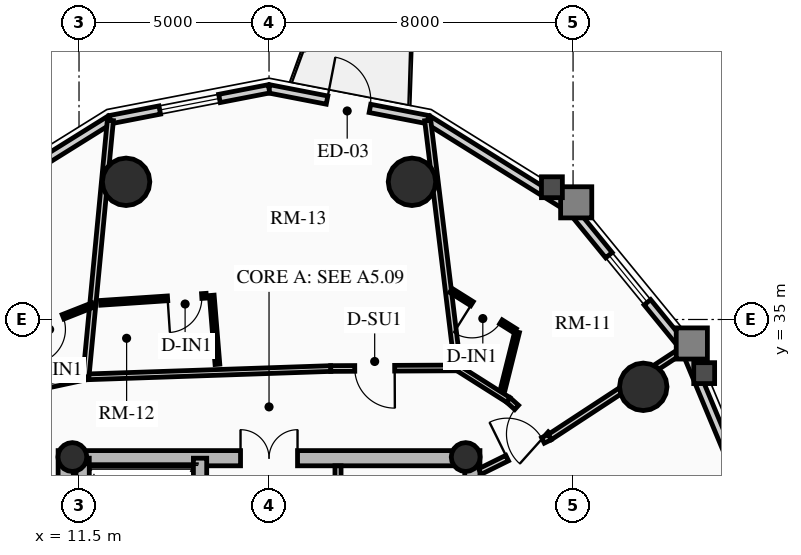
"""IFC4 building model, lengths in metres.
Left out: names, types, materials, properties, quantities, classifications, styles, units other than length and angle.
Written with IfcOpenShell. Run it as: python <this file> out.ifc"""

import sys

from ifc_helpers import new_model, si_unit, direction, frame, frame_2d, origin, origin_2d, place, context, subcontext, project, spatial, rectangle, circle, hollow_circle, extrude, source, transform, mapped, element, fill, save


model = new_model("IFC4")
c1 = context("Model", 3, precision=1e-05, world=origin(), true_north=direction((0.0, 1.0)))
c2 = subcontext(c1, "Body", "Model", "MODEL_VIEW")
j1 = project(units=[si_unit("LENGTHUNIT", "METRE"), si_unit("PLANEANGLEUNIT", "RADIAN")], contexts=[c1])
p1 = place(None, origin())
s1 = spatial("IfcSite", under=j1, at=p1, CompositionType="ELEMENT")
p2 = place(p1, origin())
s2 = spatial("IfcBuilding", under=s1, at=p2, CompositionType="ELEMENT")
p3 = place(p2, frame((0.0, 0.0, 177.79)))
s3 = spatial("IfcBuildingStorey", under=s2, at=p3, CompositionType="ELEMENT", Elevation=177.79)
for number, where, z_axis, x_axis in (
    (1, (11.15, 17.45, 0.0), (0.0, 0.0, 1.0), (0.0, 1.0, 0.0)),
    (2, (21.85, 17.45, 0.0), (0.0, 0.0, 1.0), (0.0, 1.0, 0.0)),
):
    element("IfcWall", number, at=place(p3, frame(where, z_axis=z_axis, x_axis=x_axis)), inside=s3, PredefinedType="SHEAR", context=c2, shape_type="SweptSolid", body=[
        extrude(rectangle(XDim=14.1, YDim=0.4, at=frame_2d((7.05, 0.0))), origin(), (0.0, 0.0, 1.0), 2.91),
    ])
p4 = place(p3, frame((11.15, 31.35, 0.0), z_axis=(0.0, 0.0, 1.0), x_axis=(1.0, 0.0, 0.0)))
e3 = element("IfcWall", 3, at=p4, inside=s3, PredefinedType="SHEAR", context=c2, shape_type="SweptSolid", body=[
    extrude(rectangle(XDim=10.7, YDim=0.4, at=frame_2d((5.35, 0.0))), origin(), (0.0, 0.0, 1.0), 2.91),
])
m1 = source(origin(), c2, "Body", "SweptSolid", [
    extrude(rectangle(XDim=1.5, YDim=2.02, at=frame_2d((0.75, 1.01))), frame((0.0, 0.21, 0.0), z_axis=(0.0, -1.0, 0.0), x_axis=(1.0, 0.0, 0.0)), (0.0, 0.0, 1.0), 0.42),
])
p5 = place(p4, frame((4.6, 0.0, 0.0)))
e4 = element("IfcOpeningElement", 4, at=p5, cuts=e3, PredefinedType="OPENING", context=c2, shape_type="MappedRepresentation", body=[
    mapped(m1, transform((0.0, 0.0, 0.0), x_axis=(1.0, 0.0, 0.0), y_axis=(0.0, 1.0, 0.0), z_axis=(0.0, 0.0, 1.0), scale=1.0)),
])
p6 = place(p3, frame((14.685, 17.65, 0.0), z_axis=(0.0, 0.0, 1.0), x_axis=(0.0, 1.0, 0.0)))
e5 = element("IfcWall", 5, at=p6, inside=s3, PredefinedType="SHEAR", context=c2, shape_type="SweptSolid", body=[
    extrude(rectangle(XDim=13.7, YDim=0.35, at=frame_2d((6.85, 0.0))), origin(), (0.0, 0.0, 1.0), 2.91),
])
m2 = source(origin(), c2, "Body", "SweptSolid", [
    extrude(rectangle(XDim=1.1, YDim=2.015, at=frame_2d((0.55, 1.007))), frame((0.0, 0.185, 0.0), z_axis=(0.0, -1.0, 0.0), x_axis=(1.0, 0.0, 0.0)), (0.0, 0.0, 1.0), 0.37),
])
p7 = place(p6, frame((4.85, 0.0, 0.0)))
e6 = element("IfcOpeningElement", 6, at=p7, cuts=e5, PredefinedType="OPENING", context=c2, shape_type="MappedRepresentation", body=[
    mapped(m2, transform((0.0, 0.0, 0.0), x_axis=(1.0, 0.0, 0.0), y_axis=(0.0, 1.0, 0.0), z_axis=(0.0, 0.0, 1.0), scale=1.0)),
])
p8 = place(p6, frame((0.625, 0.0, 0.0)))
e7 = element("IfcOpeningElement", 7, at=p8, cuts=e5, PredefinedType="OPENING", context=c2, shape_type="MappedRepresentation", body=[
    mapped(m2, transform((0.0, 0.0, 0.0), x_axis=(1.0, 0.0, 0.0), y_axis=(0.0, 1.0, 0.0), z_axis=(0.0, 0.0, 1.0), scale=1.0)),
])
p9 = place(p6, frame((2.625, 0.0, 0.0)))
e8 = element("IfcOpeningElement", 8, at=p9, cuts=e5, PredefinedType="OPENING", context=c2, shape_type="MappedRepresentation", body=[
    mapped(m2, transform((0.0, 0.0, 0.0), x_axis=(1.0, 0.0, 0.0), y_axis=(0.0, 1.0, 0.0), z_axis=(0.0, 0.0, 1.0), scale=1.0)),
])
m3 = source(origin(), c2, "Body", "SweptSolid", [
    extrude(rectangle(XDim=1.15, YDim=2.02, at=frame_2d((0.575, 1.01))), frame((0.0, 0.185, 0.0), z_axis=(0.0, -1.0, 0.0), x_axis=(1.0, 0.0, 0.0)), (0.0, 0.0, 1.0), 0.37),
])
p10 = place(p6, frame((7.27, 0.0, 0.0)))
e9 = element("IfcOpeningElement", 9, at=p10, cuts=e5, PredefinedType="OPENING", context=c2, shape_type="MappedRepresentation", body=[
    mapped(m3, transform((0.0, 0.0, 0.0), x_axis=(1.0, 0.0, 0.0), y_axis=(0.0, 1.0, 0.0), z_axis=(0.0, 0.0, 1.0), scale=1.0)),
])
p11 = place(p3, frame((11.595, 24.655, 0.0), z_axis=(0.0, 0.0, 1.0), x_axis=(0.0, 1.0, 0.0)))
e10 = element("IfcWall", 10, at=p11, inside=s3, PredefinedType="SHEAR", context=c2, shape_type="SweptSolid", body=[
    extrude(rectangle(XDim=6.695, YDim=0.35, at=frame_2d((3.348, 0.0))), origin(), (0.0, 0.0, 1.0), 2.91),
])
for number, where, z_axis, x_axis in (
    (11, (11.325, 31.38, 0.0), (0.0, 0.0, 1.0), (1.0, 0.0, 0.0)),
    (12, (21.675, 31.38, 0.0), (0.0, 0.0, 1.0), (1.0, 0.0, 0.0)),
):
    element("IfcColumn", number, at=place(p3, frame(where, z_axis=z_axis, x_axis=x_axis)), inside=s3, PredefinedType="COLUMN", context=c2, shape_type="SweptSolid", body=[
        extrude(hollow_circle(Radius=0.38, WallThickness=0.032, at=origin_2d()), origin(), (0.0, 0.0, 1.0), 2.91),
    ])
for number, where, z_axis, x_axis in (
    (13, (26.347, 33.229, 0.0), (0.0, 0.0, 1.0), (1.0, 0.0, 0.0)),
    (14, (20.261, 38.623, 0.0), (0.0, 0.0, 1.0), (1.0, 0.0, 0.0)),
    (15, (12.739, 38.623, 0.0), (0.0, 0.0, 1.0), (1.0, 0.0, 0.0)),
):
    element("IfcColumn", number, at=place(p3, frame(where, z_axis=z_axis, x_axis=x_axis)), inside=s3, PredefinedType="USERDEFINED", context=c2, shape_type="SweptSolid", body=[
        extrude(circle(Radius=0.625, at=origin_2d()), origin(), (0.0, 0.0, 1.0), 2.91),
    ])
p12 = place(p3, frame((27.447, 34.24, 0.0), z_axis=(0.0, 0.0, 1.0), x_axis=(0.384144094086, -0.923273152961, 0.0)))
e16 = element("IfcWall", 16, at=p12, inside=s3, PredefinedType="SOLIDWALL", context=c2, shape_type="SweptSolid", body=[
    extrude(rectangle(XDim=5.003, YDim=0.22, at=frame_2d((2.501, 0.0))), origin(), (0.0, 0.0, 1.0), 2.245),
])
p13 = place(p3, frame((24.453, 37.906, 0.0), z_axis=(0.0, 0.0, 1.0), x_axis=(0.632470615287, -0.774584353572, 0.0)))
e17 = element("IfcWall", 17, at=p13, inside=s3, PredefinedType="SOLIDWALL", context=c2, shape_type="SweptSolid", body=[
    extrude(rectangle(XDim=4.733, YDim=0.22, at=frame_2d((2.366, 0.0))), origin(), (0.0, 0.0, 1.0), 2.245),
])
m4 = source(origin(), c2, "Body", "SweptSolid", [
    extrude(rectangle(XDim=1.6, YDim=1.3, at=frame_2d((0.8, 0.65))), frame((0.0, 0.12, 0.0), z_axis=(0.0, -1.0, 0.0), x_axis=(1.0, 0.0, 0.0)), (0.0, 0.0, 1.0), 0.24),
])
p14 = place(p13, frame((1.566, 0.0, 0.65)))
e18 = element("IfcOpeningElement", 18, at=p14, cuts=e17, PredefinedType="OPENING", context=c2, shape_type="MappedRepresentation", body=[
    mapped(m4, transform((0.0, 0.0, 0.0), x_axis=(1.0, 0.0, 0.0), y_axis=(0.0, 1.0, 0.0), z_axis=(0.0, 0.0, 1.0), scale=1.0)),
])
p15 = place(p3, frame((20.681, 40.259, 0.0), z_axis=(0.0, 0.0, 1.0), x_axis=(0.848399108042, -0.529357113368, 0.0)))
e19 = element("IfcWall", 19, at=p15, inside=s3, PredefinedType="SOLIDWALL", context=c2, shape_type="SweptSolid", body=[
    extrude(rectangle(XDim=4.446, YDim=0.22, at=frame_2d((2.223, 0.0))), origin(), (0.0, 0.0, 1.0), 2.245),
])
p16 = place(p3, frame((16.5, 41.07, 0.0), z_axis=(0.0, 0.0, 1.0), x_axis=(0.981703883443, -0.190413983815, 0.0)))
e20 = element("IfcWall", 20, at=p16, inside=s3, PredefinedType="SOLIDWALL", context=c2, shape_type="SweptSolid", body=[
    extrude(rectangle(XDim=4.259, YDim=0.22, at=frame_2d((2.13, 0.0))), origin(), (0.0, 0.0, 1.0), 2.245),
])
m5 = source(origin(), c2, "Body", "SweptSolid", [
    extrude(rectangle(XDim=1.15, YDim=2.005, at=frame_2d((0.575, 1.002))), frame((0.0, 0.12, 0.0), z_axis=(0.0, -1.0, 0.0), x_axis=(1.0, 0.0, 0.0)), (0.0, 0.0, 1.0), 0.24),
])
p17 = place(p16, frame((1.555, 0.0, 0.0)))
e21 = element("IfcOpeningElement", 21, at=p17, cuts=e20, PredefinedType="OPENING", context=c2, shape_type="MappedRepresentation", body=[
    mapped(m5, transform((0.0, 0.0, 0.0), x_axis=(1.0, 0.0, 0.0), y_axis=(0.0, 1.0, 0.0), z_axis=(0.0, 0.0, 1.0), scale=1.0)),
])
p18 = place(p3, frame((12.319, 40.259, 0.0), z_axis=(0.0, 0.0, 1.0), x_axis=(0.981703883443, 0.190413983815, 0.0)))
e22 = element("IfcWall", 22, at=p18, inside=s3, PredefinedType="SOLIDWALL", context=c2, shape_type="SweptSolid", body=[
    extrude(rectangle(XDim=4.259, YDim=0.22, at=frame_2d((2.13, 0.0))), origin(), (0.0, 0.0, 1.0), 2.245),
])
p19 = place(p18, frame((1.33, 0.0, 0.65)))
e23 = element("IfcOpeningElement", 23, at=p19, cuts=e22, PredefinedType="OPENING", context=c2, shape_type="MappedRepresentation", body=[
    mapped(m4, transform((0.0, 0.0, 0.0), x_axis=(1.0, 0.0, 0.0), y_axis=(0.0, 1.0, 0.0), z_axis=(0.0, 0.0, 1.0), scale=1.0)),
])
p20 = place(p3, frame((8.547, 37.906, 0.0), z_axis=(0.0, 0.0, 1.0), x_axis=(0.848399108042, 0.529357113368, 0.0)))
e24 = element("IfcWall", 24, at=p20, inside=s3, PredefinedType="SOLIDWALL", context=c2, shape_type="SweptSolid", body=[
    extrude(rectangle(XDim=4.446, YDim=0.22, at=frame_2d((2.223, 0.0))), origin(), (0.0, 0.0, 1.0), 2.245),
])
p21 = place(p3, frame((18.315, 27.25, 0.0), z_axis=(0.0, 0.0, 1.0), x_axis=(0.0, 1.0, 0.0)))
e25 = element("IfcWall", 25, at=p21, inside=s3, PredefinedType="PARTITIONING", context=c2, shape_type="SweptSolid", body=[
    extrude(rectangle(XDim=3.9, YDim=0.16, at=frame_2d((1.95, 0.0))), origin(), (0.0, 0.0, 1.0), 2.675),
])
m6 = source(origin(), c2, "Body", "SweptSolid", [
    extrude(rectangle(XDim=0.9, YDim=2.005, at=frame_2d((0.45, 1.002))), frame((0.0, 0.09, 0.0), z_axis=(0.0, -1.0, 0.0), x_axis=(1.0, 0.0, 0.0)), (0.0, 0.0, 1.0), 0.18),
])
p22 = place(p21, frame((2.2, 0.0, 0.0)))
e26 = element("IfcOpeningElement", 26, at=p22, cuts=e25, PredefinedType="OPENING", context=c2, shape_type="MappedRepresentation", body=[
    mapped(m6, transform((0.0, 0.0, 0.0), x_axis=(1.0, 0.0, 0.0), y_axis=(0.0, 1.0, 0.0), z_axis=(0.0, 0.0, 1.0), scale=1.0)),
])
p23 = place(p3, frame((23.887, 31.906, 0.0), z_axis=(0.0, 0.0, 1.0), x_axis=(-0.744900957214, 0.66717506244, 0.0)))
e27 = element("IfcWall", 27, at=p23, inside=s3, PredefinedType="PARTITIONING", context=c2, shape_type="SweptSolid", body=[
    extrude(rectangle(XDim=1.464, YDim=0.15, at=frame_2d((0.732, 0.0))), origin(), (0.0, 0.0, 1.0), 2.245),
])
m7 = source(origin(), c2, "Body", "SweptSolid", [
    extrude(rectangle(XDim=1.05, YDim=2.015, at=frame_2d((0.525, 1.007))), frame((0.0, 0.085, 0.0), z_axis=(0.0, -1.0, 0.0), x_axis=(1.0, 0.0, 0.0)), (0.0, 0.0, 1.0), 0.17),
])
p24 = place(p23, frame((0.12, 0.0, 0.0)))
e28 = element("IfcOpeningElement", 28, at=p24, cuts=e27, PredefinedType="OPENING", context=c2, shape_type="MappedRepresentation", body=[
    mapped(m7, transform((0.0, 0.0, 0.0), x_axis=(1.0, 0.0, 0.0), y_axis=(0.0, 1.0, 0.0), z_axis=(0.0, 0.0, 1.0), scale=1.0)),
])
p25 = place(p3, frame((22.797, 32.883, 0.0), z_axis=(0.0, 0.0, 1.0), x_axis=(-0.84484009232, 0.535018895375, 0.0)))
e29 = element("IfcWall", 29, at=p25, inside=s3, PredefinedType="PARTITIONING", context=c2, shape_type="SweptSolid", body=[
    extrude(rectangle(XDim=1.575, YDim=0.15, at=frame_2d((0.788, 0.0))), origin(), (0.0, 0.0, 1.0), 2.245),
])
p26 = place(p3, frame((21.466, 33.726, 0.0), z_axis=(0.0, 0.0, 1.0), x_axis=(-0.99998838579, -0.004819573058, 0.0)))
e30 = element("IfcWall", 30, at=p26, inside=s3, PredefinedType="PARTITIONING", context=c2, shape_type="SweptSolid", body=[
    extrude(rectangle(XDim=3.343, YDim=0.15, at=frame_2d((1.672, 0.0))), origin(), (0.0, 0.0, 1.0), 2.245),
])
p27 = place(p26, frame((1.66, 0.0, 0.0)))
e31 = element("IfcOpeningElement", 31, at=p27, cuts=e30, PredefinedType="OPENING", context=c2, shape_type="MappedRepresentation", body=[
    mapped(m7, transform((0.0, 0.0, 0.0), x_axis=(1.0, 0.0, 0.0), y_axis=(0.0, 1.0, 0.0), z_axis=(0.0, 0.0, 1.0), scale=1.0)),
])
p28 = place(p3, frame((18.123, 33.709, 0.0), z_axis=(0.0, 0.0, 1.0), x_axis=(-0.999417459976, -0.034128297572, 0.0)))
e32 = element("IfcWall", 32, at=p28, inside=s3, PredefinedType="PARTITIONING", context=c2, shape_type="SweptSolid", body=[
    extrude(rectangle(XDim=6.445, YDim=0.15, at=frame_2d((3.223, 0.0))), origin(), (0.0, 0.0, 1.0), 2.245),
])
p29 = place(p3, frame((11.681, 33.49, 0.0), z_axis=(0.0, 0.0, 1.0), x_axis=(-0.977628265995, -0.2103401377, 0.0)))
e33 = element("IfcWall", 33, at=p29, inside=s3, PredefinedType="PARTITIONING", context=c2, shape_type="SweptSolid", body=[
    extrude(rectangle(XDim=1.912, YDim=0.15, at=frame_2d((0.956, 0.0))), origin(), (0.0, 0.0, 1.0), 2.245),
])
p30 = place(p3, frame((23.887, 31.906, 0.0), z_axis=(0.0, 0.0, 1.0), x_axis=(0.836482991446, 0.547992887748, 0.0)))
e34 = element("IfcWall", 34, at=p30, inside=s3, PredefinedType="PARTITIONING", context=c2, shape_type="SweptSolid", body=[
    extrude(rectangle(XDim=4.236, YDim=0.16, at=frame_2d((2.118, 0.0))), origin(), (0.0, 0.0, 1.0), 2.245),
])
p31 = place(p3, frame((21.466, 33.726, 0.0), z_axis=(0.0, 0.0, 1.0), x_axis=(-0.12050358126, 0.992712892484, 0.0)))
e35 = element("IfcWall", 35, at=p31, inside=s3, PredefinedType="PARTITIONING", context=c2, shape_type="SweptSolid", body=[
    extrude(rectangle(XDim=6.562, YDim=0.16, at=frame_2d((3.281, 0.0))), origin(), (0.0, 0.0, 1.0), 2.245),
])
p32 = place(p3, frame((11.681, 33.49, 0.0), z_axis=(0.0, 0.0, 1.0), x_axis=(0.094975594504, 0.995479601222, 0.0)))
e36 = element("IfcWall", 36, at=p32, inside=s3, PredefinedType="PARTITIONING", context=c2, shape_type="SweptSolid", body=[
    extrude(rectangle(XDim=6.781, YDim=0.16, at=frame_2d((3.391, 0.0))), origin(), (0.0, 0.0, 1.0), 2.245),
])
p33 = place(p3, frame((22.05, 31.0, 0.0), z_axis=(0.0, 0.0, 1.0), x_axis=(0.896798317999, 0.442439574218, 0.0)))
e37 = element("IfcWall", 37, at=p33, inside=s3, PredefinedType="PARTITIONING", context=c2, shape_type="SweptSolid", body=[
    extrude(rectangle(XDim=2.048, YDim=0.16, at=frame_2d((1.024, 0.0))), origin(), (0.0, 0.0, 1.0), 2.245),
])
m8 = source(origin(), c2, "Body", "SweptSolid", [
    extrude(rectangle(XDim=1.05, YDim=2.015, at=frame_2d((0.525, 1.007))), frame((0.0, 0.09, 0.0), z_axis=(0.0, -1.0, 0.0), x_axis=(1.0, 0.0, 0.0)), (0.0, 0.0, 1.0), 0.18),
])
p34 = place(p33, frame((0.798, 0.0, 0.0)))
e38 = element("IfcOpeningElement", 38, at=p34, cuts=e37, PredefinedType="OPENING", context=c2, shape_type="MappedRepresentation", body=[
    mapped(m8, transform((0.0, 0.0, 0.0), x_axis=(1.0, 0.0, 0.0), y_axis=(0.0, 1.0, 0.0), z_axis=(0.0, 0.0, 1.0), scale=1.0)),
])
p35 = place(p3, frame((22.649, 33.157, 0.0), z_axis=(0.0, 0.0, 1.0), x_axis=(0.242461964074, 0.970160912415, 0.0)))
e39 = element("IfcWall", 39, at=p35, inside=s3, PredefinedType="PARTITIONING", context=c2, shape_type="SweptSolid", body=[
    extrude(rectangle(XDim=1.56, YDim=0.125, at=frame_2d((0.78, 0.0))), origin(), (0.0, 0.0, 1.0), 2.245),
])
p36 = place(p3, frame((22.975, 34.704, 0.0), z_axis=(0.0, 0.0, 1.0), x_axis=(-0.84683355027, 0.531858005615, 0.0)))
e40 = element("IfcWall", 40, at=p36, inside=s3, PredefinedType="PARTITIONING", context=c2, shape_type="SweptSolid", body=[
    extrude(rectangle(XDim=1.994, YDim=0.125, at=frame_2d((0.997, 0.0))), origin(), (0.0, 0.0, 1.0), 2.675),
])
m9 = source(origin(), c2, "Body", "SweptSolid", [
    extrude(rectangle(XDim=0.9, YDim=2.005, at=frame_2d((0.45, 1.002))), frame((0.0, 0.073, 0.0), z_axis=(0.0, -1.0, 0.0), x_axis=(1.0, 0.0, 0.0)), (0.0, 0.0, 1.0), 0.145),
])
p37 = place(p36, frame((0.44, 0.0, 0.0)))
e41 = element("IfcOpeningElement", 41, at=p37, cuts=e40, PredefinedType="OPENING", context=c2, shape_type="MappedRepresentation", body=[
    mapped(m9, transform((0.0, 0.0, 0.0), x_axis=(1.0, 0.0, 0.0), y_axis=(0.0, 1.0, 0.0), z_axis=(0.0, 0.0, 1.0), scale=1.0)),
])
p38 = place(p3, frame((15.142, 33.82, 0.0), z_axis=(0.0, 0.0, 1.0), x_axis=(-0.081791493646, 0.996649462734, 0.0)))
e42 = element("IfcWall", 42, at=p38, inside=s3, PredefinedType="PARTITIONING", context=c2, shape_type="SweptSolid", body=[
    extrude(rectangle(XDim=1.821, YDim=0.125, at=frame_2d((0.91, 0.0))), origin(), (0.0, 0.0, 1.0), 2.675),
])
p39 = place(p3, frame((14.848, 35.625, 0.0), z_axis=(0.0, 0.0, 1.0), x_axis=(-0.997750908336, -0.067030775874, 0.0)))
e43 = element("IfcWall", 43, at=p39, inside=s3, PredefinedType="PARTITIONING", context=c2, shape_type="SweptSolid", body=[
    extrude(rectangle(XDim=2.786, YDim=0.125, at=frame_2d((1.393, 0.0))), origin(), (0.0, 0.0, 1.0), 2.245),
])
p40 = place(p39, frame((0.12, 0.0, 0.0)))
e44 = element("IfcOpeningElement", 44, at=p40, cuts=e43, PredefinedType="OPENING", context=c2, shape_type="MappedRepresentation", body=[
    mapped(m9, transform((0.0, 0.0, 0.0), x_axis=(1.0, 0.0, 0.0), y_axis=(0.0, 1.0, 0.0), z_axis=(0.0, 0.0, 1.0), scale=1.0)),
])
p41 = place(p3, frame((11.861, 35.38, 0.0), z_axis=(0.0, 0.0, 1.0), x_axis=(-0.930124609977, -0.367244074037, 0.0)))
e45 = element("IfcWall", 45, at=p41, inside=s3, PredefinedType="PARTITIONING", context=c2, shape_type="SweptSolid", body=[
    extrude(rectangle(XDim=2.581, YDim=0.125, at=frame_2d((1.291, 0.0))), origin(), (0.0, 0.0, 1.0), 2.245),
])
p42 = place(p41, frame((0.84, 0.0, 0.0)))
e46 = element("IfcOpeningElement", 46, at=p42, cuts=e45, PredefinedType="OPENING", context=c2, shape_type="MappedRepresentation", body=[
    mapped(m9, transform((0.0, 0.0, 0.0), x_axis=(1.0, 0.0, 0.0), y_axis=(0.0, 1.0, 0.0), z_axis=(0.0, 0.0, 1.0), scale=1.0)),
])
m10 = source(origin(), c2, "Body", "SweptSolid", [
    extrude(rectangle(XDim=1.6, YDim=1.3, at=frame_2d((0.8, 0.65))), frame((0.0, 0.03, 0.0), z_axis=(0.0, -1.0, 0.0), x_axis=(1.0, 0.0, 0.0)), (0.0, 0.0, 1.0), 0.06),
])
p43 = place(p14, origin())
e47 = element("IfcWindow", 47, at=p43, inside=s3, PartitioningType="SINGLE_PANEL", PredefinedType="WINDOW", context=c2, shape_type="MappedRepresentation", body=[
    mapped(m10, transform((0.0, 0.0, 0.0), x_axis=(1.0, 0.0, 0.0), y_axis=(0.0, 1.0, 0.0), z_axis=(0.0, 0.0, 1.0), scale=1.0)),
])
fill(e18, e47)
m11 = source(origin(), c2, "Body", "SweptSolid", [
    extrude(rectangle(XDim=1.15, YDim=2.005, at=frame_2d((0.575, 1.002))), frame((0.0, 0.025, 0.0), z_axis=(0.0, -1.0, 0.0), x_axis=(1.0, 0.0, 0.0)), (0.0, 0.0, 1.0), 0.05),
])
p44 = place(p17, origin())
e48 = element("IfcDoor", 48, at=p44, inside=s3, OperationType="SINGLE_SWING_LEFT", PredefinedType="DOOR", context=c2, shape_type="MappedRepresentation", body=[
    mapped(m11, transform((0.0, 0.0, 0.0), x_axis=(1.0, 0.0, 0.0), y_axis=(0.0, 1.0, 0.0), z_axis=(0.0, 0.0, 1.0), scale=1.0)),
])
fill(e21, e48)
p45 = place(p19, origin())
e49 = element("IfcWindow", 49, at=p45, inside=s3, PartitioningType="SINGLE_PANEL", PredefinedType="WINDOW", context=c2, shape_type="MappedRepresentation", body=[
    mapped(m10, transform((0.0, 0.0, 0.0), x_axis=(1.0, 0.0, 0.0), y_axis=(0.0, 1.0, 0.0), z_axis=(0.0, 0.0, 1.0), scale=1.0)),
])
fill(e23, e49)
m12 = source(origin(), c2, "Body", "SweptSolid", [
    extrude(rectangle(XDim=1.5, YDim=2.02, at=frame_2d((0.75, 1.01))), frame((0.0, 0.025, 0.0), z_axis=(0.0, -1.0, 0.0), x_axis=(1.0, 0.0, 0.0)), (0.0, 0.0, 1.0), 0.05),
])
p46 = place(p5, origin())
e50 = element("IfcDoor", 50, at=p46, inside=s3, OperationType="DOUBLE_DOOR_SINGLE_SWING", PredefinedType="DOOR", context=c2, shape_type="MappedRepresentation", body=[
    mapped(m12, transform((0.0, 0.0, 0.0), x_axis=(1.0, 0.0, 0.0), y_axis=(0.0, 1.0, 0.0), z_axis=(0.0, 0.0, 1.0), scale=1.0)),
])
fill(e4, e50)
m13 = source(origin(), c2, "Body", "SweptSolid", [
    extrude(rectangle(XDim=1.05, YDim=2.015, at=frame_2d((0.525, 1.007))), frame((0.0, 0.025, 0.0), z_axis=(0.0, -1.0, 0.0), x_axis=(1.0, 0.0, 0.0)), (0.0, 0.0, 1.0), 0.05),
])
p47 = place(p34, origin())
e51 = element("IfcDoor", 51, at=p47, inside=s3, OperationType="SINGLE_SWING_LEFT", PredefinedType="DOOR", context=c2, shape_type="MappedRepresentation", body=[
    mapped(m13, transform((0.0, 0.0, 0.0), x_axis=(1.0, 0.0, 0.0), y_axis=(0.0, 1.0, 0.0), z_axis=(0.0, 0.0, 1.0), scale=1.0)),
])
fill(e38, e51)
p48 = place(p24, origin())
e52 = element("IfcDoor", 52, at=p48, inside=s3, OperationType="SINGLE_SWING_LEFT", PredefinedType="DOOR", context=c2, shape_type="MappedRepresentation", body=[
    mapped(m13, transform((0.0, 0.0, 0.0), x_axis=(1.0, 0.0, 0.0), y_axis=(0.0, 1.0, 0.0), z_axis=(0.0, 0.0, 1.0), scale=1.0)),
])
fill(e28, e52)
m14 = source(origin(), c2, "Body", "SweptSolid", [
    extrude(rectangle(XDim=0.9, YDim=2.005, at=frame_2d((0.45, 1.002))), frame((0.0, 0.025, 0.0), z_axis=(0.0, -1.0, 0.0), x_axis=(1.0, 0.0, 0.0)), (0.0, 0.0, 1.0), 0.05),
])
p49 = place(p37, origin())
e53 = element("IfcDoor", 53, at=p49, inside=s3, OperationType="SINGLE_SWING_RIGHT", PredefinedType="DOOR", context=c2, shape_type="MappedRepresentation", body=[
    mapped(m14, transform((0.0, 0.0, 0.0), x_axis=(1.0, 0.0, 0.0), y_axis=(0.0, 1.0, 0.0), z_axis=(0.0, 0.0, 1.0), scale=1.0)),
])
fill(e41, e53)
p50 = place(p27, origin())
e54 = element("IfcDoor", 54, at=p50, inside=s3, OperationType="SINGLE_SWING_LEFT", PredefinedType="DOOR", context=c2, shape_type="MappedRepresentation", body=[
    mapped(m13, transform((0.0, 0.0, 0.0), x_axis=(1.0, 0.0, 0.0), y_axis=(0.0, 1.0, 0.0), z_axis=(0.0, 0.0, 1.0), scale=1.0)),
])
fill(e31, e54)
p51 = place(p40, origin())
e55 = element("IfcDoor", 55, at=p51, inside=s3, OperationType="SINGLE_SWING_RIGHT", PredefinedType="DOOR", context=c2, shape_type="MappedRepresentation", body=[
    mapped(m14, transform((0.0, 0.0, 0.0), x_axis=(1.0, 0.0, 0.0), y_axis=(0.0, 1.0, 0.0), z_axis=(0.0, 0.0, 1.0), scale=1.0)),
])
fill(e44, e55)
p52 = place(p42, origin())
e56 = element("IfcDoor", 56, at=p52, inside=s3, OperationType="SINGLE_SWING_RIGHT", PredefinedType="DOOR", context=c2, shape_type="MappedRepresentation", body=[
    mapped(m14, transform((0.0, 0.0, 0.0), x_axis=(1.0, 0.0, 0.0), y_axis=(0.0, 1.0, 0.0), z_axis=(0.0, 0.0, 1.0), scale=1.0)),
])
fill(e46, e56)
save(model, sys.argv[1])
